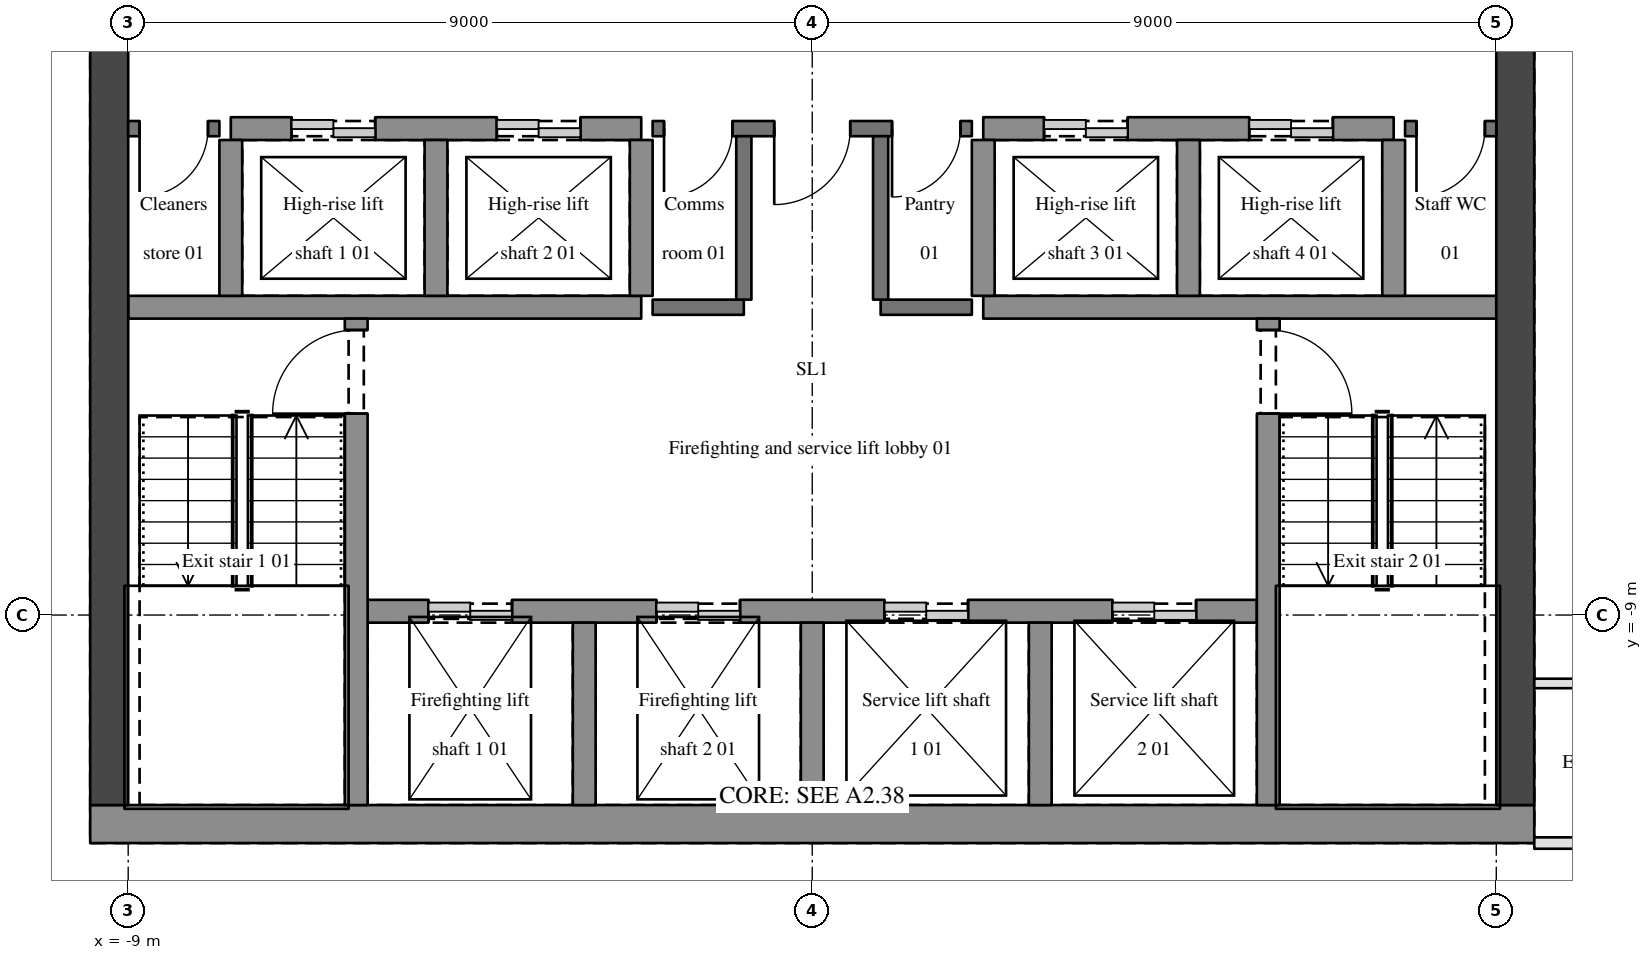
"""IFC4 building model, lengths in metres.
Left out: names, types, materials, properties, quantities, classifications, styles, units other than length and angle.
Written with IfcOpenShell. Run it as: python <this file> out.ifc"""

import sys

from ifc_helpers import new_model, si_unit, direction, frame, frame_2d, origin, place, context, subcontext, project, spatial, rectangle, extrude, element, fill, save


model = new_model("IFC4")
c1 = context("Model", 3, precision=1e-05, world=origin(), true_north=direction((0.0, 1.0)))
c2 = subcontext(c1, "Body", "Model", "MODEL_VIEW")
j1 = project(units=[si_unit("LENGTHUNIT", "METRE"), si_unit("PLANEANGLEUNIT", "RADIAN")], contexts=[c1])
p1 = place(None, origin())
s1 = spatial("IfcSite", under=j1, at=p1, CompositionType="ELEMENT")
p2 = place(p1, origin())
s2 = spatial("IfcBuilding", under=s1, at=p2, CompositionType="ELEMENT")
p3 = place(p2, frame((0.0, 0.0, 259.5)))
s3 = spatial("IfcBuildingStorey", under=s2, at=p3, CompositionType="ELEMENT", Elevation=259.5)
p4 = place(p3, frame((-9.5, -11.75, 0.0), z_axis=(0.0, 0.0, 1.0), x_axis=(1.0, 0.0, 0.0)))
e1 = element("IfcWall", 1, at=p4, inside=s3, PredefinedType="SHEAR", context=c2, shape_type="SweptSolid", body=[
    extrude(rectangle(XDim=19.0, YDim=0.5, at=frame_2d((9.5, 0.0))), origin(), (0.0, 0.0, 1.0), 3.15),
])
for number, where, z_axis, x_axis in (
    (2, (-9.25, -11.5, 0.0), (0.0, 0.0, 1.0), (0.0, 1.0, 0.0)),
    (3, (9.25, -11.5, 0.0), (0.0, 0.0, 1.0), (0.0, 1.0, 0.0)),
):
    element("IfcWall", number, at=place(p3, frame(where, z_axis=z_axis, x_axis=x_axis)), inside=s3, PredefinedType="SHEAR", context=c2, shape_type="SweptSolid", body=[
        extrude(rectangle(XDim=11.65, YDim=0.5, at=frame_2d((5.825, 0.0))), origin(), (0.0, 0.0, 1.0), 3.15),
    ])
p5 = place(p3, frame((9.5, -12.0, 0.0), z_axis=(0.0, 0.0, 1.0), x_axis=(1.0, 0.0, 0.0)))
e4 = element("IfcWall", 4, at=p5, inside=s3, PredefinedType="PARTITIONING", context=c2, shape_type="SweptSolid", body=[
    extrude(rectangle(XDim=10.243, YDim=0.15, at=frame_2d((5.122, 0.0))), origin(), (0.0, 0.0, 1.0), 2.21),
])
p6 = place(p3, frame((9.5, -9.9, 0.0), z_axis=(0.0, 0.0, 1.0), x_axis=(1.0, 0.0, 0.0)))
e5 = element("IfcWall", 5, at=p6, inside=s3, PredefinedType="PARTITIONING", context=c2, shape_type="SweptSolid", body=[
    extrude(rectangle(XDim=2.938, YDim=0.125, at=frame_2d((1.469, 0.0))), origin(), (0.0, 0.0, 1.0), 2.21),
])
p7 = place(p3, frame((-5.85, -8.95, 0.0), z_axis=(0.0, 0.0, 1.0), x_axis=(1.0, 0.0, 0.0)))
e6 = element("IfcWall", 6, at=p7, inside=s3, PredefinedType="SHEAR", context=c2, shape_type="SweptSolid", body=[
    extrude(rectangle(XDim=11.7, YDim=0.3, at=frame_2d((5.85, 0.0))), origin(), (0.0, 0.0, 1.0), 3.15),
])
p8 = place(p7, frame((0.8, 0.0, 0.0)))
e7 = element("IfcOpeningElement", 7, at=p8, cuts=e6, PredefinedType="OPENING", context=c2, shape_type="SweptSolid", body=[
    extrude(rectangle(XDim=1.1, YDim=2.1, at=frame_2d((0.55, 1.05))), frame((0.0, 0.16, 0.0), z_axis=(0.0, -1.0, 0.0), x_axis=(1.0, 0.0, 0.0)), (0.0, 0.0, 1.0), 0.32),
])
p9 = place(p7, frame((3.8, 0.0, 0.0)))
e8 = element("IfcOpeningElement", 8, at=p9, cuts=e6, PredefinedType="OPENING", context=c2, shape_type="SweptSolid", body=[
    extrude(rectangle(XDim=1.1, YDim=2.1, at=frame_2d((0.55, 1.05))), frame((0.0, 0.16, 0.0), z_axis=(0.0, -1.0, 0.0), x_axis=(1.0, 0.0, 0.0)), (0.0, 0.0, 1.0), 0.32),
])
p10 = place(p7, frame((6.8, 0.0, 0.0)))
e9 = element("IfcOpeningElement", 9, at=p10, cuts=e6, PredefinedType="OPENING", context=c2, shape_type="SweptSolid", body=[
    extrude(rectangle(XDim=1.1, YDim=2.1, at=frame_2d((0.55, 1.05))), frame((0.0, 0.16, 0.0), z_axis=(0.0, -1.0, 0.0), x_axis=(1.0, 0.0, 0.0)), (0.0, 0.0, 1.0), 0.32),
])
p11 = place(p7, frame((9.8, 0.0, 0.0)))
e10 = element("IfcOpeningElement", 10, at=p11, cuts=e6, PredefinedType="OPENING", context=c2, shape_type="SweptSolid", body=[
    extrude(rectangle(XDim=1.1, YDim=2.1, at=frame_2d((0.55, 1.05))), frame((0.0, 0.16, 0.0), z_axis=(0.0, -1.0, 0.0), x_axis=(1.0, 0.0, 0.0)), (0.0, 0.0, 1.0), 0.32),
])
p12 = place(p3, frame((-9.0, -4.95, 0.0), z_axis=(0.0, 0.0, 1.0), x_axis=(1.0, 0.0, 0.0)))
e11 = element("IfcWall", 11, at=p12, inside=s3, PredefinedType="SHEAR", context=c2, shape_type="SweptSolid", body=[
    extrude(rectangle(XDim=6.75, YDim=0.3, at=frame_2d((3.375, 0.0))), origin(), (0.0, 0.0, 1.0), 3.15),
])
for number, where, z_axis, x_axis in (
    (12, (-2.1, -4.95, 0.0), (0.0, 0.0, 1.0), (1.0, 0.0, 0.0)),
    (13, (0.9, -4.95, 0.0), (0.0, 0.0, 1.0), (1.0, 0.0, 0.0)),
):
    element("IfcWall", number, at=place(p3, frame(where, z_axis=z_axis, x_axis=x_axis)), inside=s3, PredefinedType="SOLIDWALL", context=c2, shape_type="SweptSolid", body=[
        extrude(rectangle(XDim=1.2, YDim=0.2, at=frame_2d((0.6, 0.0))), origin(), (0.0, 0.0, 1.0), 2.85),
    ])
p13 = place(p3, frame((2.25, -4.95, 0.0), z_axis=(0.0, 0.0, 1.0), x_axis=(1.0, 0.0, 0.0)))
e14 = element("IfcWall", 14, at=p13, inside=s3, PredefinedType="SHEAR", context=c2, shape_type="SweptSolid", body=[
    extrude(rectangle(XDim=6.75, YDim=0.3, at=frame_2d((3.375, 0.0))), origin(), (0.0, 0.0, 1.0), 3.15),
])
p14 = place(p3, frame((-7.8, -2.6, 0.0), z_axis=(0.0, 0.0, 1.0), x_axis=(-1.0, 0.0, 0.0)))
e15 = element("IfcWall", 15, at=p14, inside=s3, PredefinedType="SOLIDWALL", context=c2, shape_type="SweptSolid", body=[
    extrude(rectangle(XDim=1.2, YDim=0.2, at=frame_2d((0.6, 0.0))), origin(), (0.0, 0.0, 1.0), 2.85),
])
p15 = place(p14, frame((0.15, 0.0, 0.0)))
e16 = element("IfcOpeningElement", 16, at=p15, cuts=e15, PredefinedType="OPENING", context=c2, shape_type="SweptSolid", body=[
    extrude(rectangle(XDim=0.9, YDim=2.1, at=frame_2d((0.45, 1.05))), frame((0.0, 0.11, 0.0), z_axis=(0.0, -1.0, 0.0), x_axis=(1.0, 0.0, 0.0)), (0.0, 0.0, 1.0), 0.22),
])
p16 = place(p3, frame((-7.65, -2.6, 0.0), z_axis=(0.0, 0.0, 1.0), x_axis=(1.0, 0.0, 0.0)))
e17 = element("IfcWall", 17, at=p16, inside=s3, PredefinedType="SHEAR", context=c2, shape_type="SweptSolid", body=[
    extrude(rectangle(XDim=5.4, YDim=0.3, at=frame_2d((2.7, 0.0))), origin(), (0.0, 0.0, 1.0), 3.15),
])
p17 = place(p16, frame((0.8, 0.0, 0.0)))
e18 = element("IfcOpeningElement", 18, at=p17, cuts=e17, PredefinedType="OPENING", context=c2, shape_type="SweptSolid", body=[
    extrude(rectangle(XDim=1.1, YDim=2.1, at=frame_2d((0.55, 1.05))), frame((0.0, 0.16, 0.0), z_axis=(0.0, -1.0, 0.0), x_axis=(1.0, 0.0, 0.0)), (0.0, 0.0, 1.0), 0.32),
])
p18 = place(p16, frame((3.5, 0.0, 0.0)))
e19 = element("IfcOpeningElement", 19, at=p18, cuts=e17, PredefinedType="OPENING", context=c2, shape_type="SweptSolid", body=[
    extrude(rectangle(XDim=1.1, YDim=2.1, at=frame_2d((0.55, 1.05))), frame((0.0, 0.16, 0.0), z_axis=(0.0, -1.0, 0.0), x_axis=(1.0, 0.0, 0.0)), (0.0, 0.0, 1.0), 0.32),
])
p19 = place(p3, frame((2.1, -2.6, 0.0), z_axis=(0.0, 0.0, 1.0), x_axis=(-1.0, 0.0, 0.0)))
e20 = element("IfcWall", 20, at=p19, inside=s3, PredefinedType="SOLIDWALL", context=c2, shape_type="SweptSolid", body=[
    extrude(rectangle(XDim=4.2, YDim=0.2, at=frame_2d((2.1, 0.0))), origin(), (0.0, 0.0, 1.0), 2.85),
])
p20 = place(p19, frame((1.6, 0.0, 0.0)))
e21 = element("IfcOpeningElement", 21, at=p20, cuts=e20, PredefinedType="OPENING", context=c2, shape_type="SweptSolid", body=[
    extrude(rectangle(XDim=1.0, YDim=2.1, at=frame_2d((0.5, 1.05))), frame((0.0, 0.11, 0.0), z_axis=(0.0, -1.0, 0.0), x_axis=(1.0, 0.0, 0.0)), (0.0, 0.0, 1.0), 0.22),
])
p21 = place(p19, frame((3.15, 0.0, 0.0)))
e22 = element("IfcOpeningElement", 22, at=p21, cuts=e20, PredefinedType="OPENING", context=c2, shape_type="SweptSolid", body=[
    extrude(rectangle(XDim=0.9, YDim=2.1, at=frame_2d((0.45, 1.05))), frame((0.0, 0.11, 0.0), z_axis=(0.0, -1.0, 0.0), x_axis=(1.0, 0.0, 0.0)), (0.0, 0.0, 1.0), 0.22),
])
p22 = place(p19, frame((0.15, 0.0, 0.0)))
e23 = element("IfcOpeningElement", 23, at=p22, cuts=e20, PredefinedType="OPENING", context=c2, shape_type="SweptSolid", body=[
    extrude(rectangle(XDim=0.9, YDim=2.1, at=frame_2d((0.45, 1.05))), frame((0.0, 0.11, 0.0), z_axis=(0.0, -1.0, 0.0), x_axis=(1.0, 0.0, 0.0)), (0.0, 0.0, 1.0), 0.22),
])
p23 = place(p3, frame((2.25, -2.6, 0.0), z_axis=(0.0, 0.0, 1.0), x_axis=(1.0, 0.0, 0.0)))
e24 = element("IfcWall", 24, at=p23, inside=s3, PredefinedType="SHEAR", context=c2, shape_type="SweptSolid", body=[
    extrude(rectangle(XDim=5.4, YDim=0.3, at=frame_2d((2.7, 0.0))), origin(), (0.0, 0.0, 1.0), 3.15),
])
p24 = place(p23, frame((0.8, 0.0, 0.0)))
e25 = element("IfcOpeningElement", 25, at=p24, cuts=e24, PredefinedType="OPENING", context=c2, shape_type="SweptSolid", body=[
    extrude(rectangle(XDim=1.1, YDim=2.1, at=frame_2d((0.55, 1.05))), frame((0.0, 0.16, 0.0), z_axis=(0.0, -1.0, 0.0), x_axis=(1.0, 0.0, 0.0)), (0.0, 0.0, 1.0), 0.32),
])
p25 = place(p23, frame((3.5, 0.0, 0.0)))
e26 = element("IfcOpeningElement", 26, at=p25, cuts=e24, PredefinedType="OPENING", context=c2, shape_type="SweptSolid", body=[
    extrude(rectangle(XDim=1.1, YDim=2.1, at=frame_2d((0.55, 1.05))), frame((0.0, 0.16, 0.0), z_axis=(0.0, -1.0, 0.0), x_axis=(1.0, 0.0, 0.0)), (0.0, 0.0, 1.0), 0.32),
])
p26 = place(p3, frame((9.0, -2.6, 0.0), z_axis=(0.0, 0.0, 1.0), x_axis=(-1.0, 0.0, 0.0)))
e27 = element("IfcWall", 27, at=p26, inside=s3, PredefinedType="SOLIDWALL", context=c2, shape_type="SweptSolid", body=[
    extrude(rectangle(XDim=1.2, YDim=0.2, at=frame_2d((0.6, 0.0))), origin(), (0.0, 0.0, 1.0), 2.85),
])
p27 = place(p26, frame((0.15, 0.0, 0.0)))
e28 = element("IfcOpeningElement", 28, at=p27, cuts=e27, PredefinedType="OPENING", context=c2, shape_type="SweptSolid", body=[
    extrude(rectangle(XDim=0.9, YDim=2.1, at=frame_2d((0.45, 1.05))), frame((0.0, 0.11, 0.0), z_axis=(0.0, -1.0, 0.0), x_axis=(1.0, 0.0, 0.0)), (0.0, 0.0, 1.0), 0.22),
])
p28 = place(p3, frame((-7.65, -4.8, 0.0), z_axis=(0.0, 0.0, 1.0), x_axis=(0.0, 1.0, 0.0)))
e29 = element("IfcWall", 29, at=p28, inside=s3, PredefinedType="SHEAR", context=c2, shape_type="SweptSolid", body=[
    extrude(rectangle(XDim=2.05, YDim=0.3, at=frame_2d((1.025, 0.0))), origin(), (0.0, 0.0, 1.0), 3.15),
])
p29 = place(p3, frame((-6.0, -11.5, 0.0), z_axis=(0.0, 0.0, 1.0), x_axis=(0.0, 1.0, 0.0)))
e30 = element("IfcWall", 30, at=p29, inside=s3, PredefinedType="SHEAR", context=c2, shape_type="SweptSolid", body=[
    extrude(rectangle(XDim=6.4, YDim=0.3, at=frame_2d((3.2, 0.0))), origin(), (0.0, 0.0, 1.0), 3.15),
])
p30 = place(p29, frame((5.15, 0.0, 0.0)))
e31 = element("IfcOpeningElement", 31, at=p30, cuts=e30, PredefinedType="OPENING", context=c2, shape_type="SweptSolid", body=[
    extrude(rectangle(XDim=1.1, YDim=2.1, at=frame_2d((0.55, 1.05))), frame((0.0, 0.16, 0.0), z_axis=(0.0, -1.0, 0.0), x_axis=(1.0, 0.0, 0.0)), (0.0, 0.0, 1.0), 0.32),
])
p31 = place(p3, frame((-4.95, -4.8, 0.0), z_axis=(0.0, 0.0, 1.0), x_axis=(0.0, 1.0, 0.0)))
e32 = element("IfcWall", 32, at=p31, inside=s3, PredefinedType="SHEAR", context=c2, shape_type="SweptSolid", body=[
    extrude(rectangle(XDim=2.05, YDim=0.3, at=frame_2d((1.025, 0.0))), origin(), (0.0, 0.0, 1.0), 3.15),
])
p32 = place(p3, frame((-3.0, -11.5, 0.0), z_axis=(0.0, 0.0, 1.0), x_axis=(0.0, 1.0, 0.0)))
e33 = element("IfcWall", 33, at=p32, inside=s3, PredefinedType="SHEAR", context=c2, shape_type="SweptSolid", body=[
    extrude(rectangle(XDim=2.4, YDim=0.3, at=frame_2d((1.2, 0.0))), origin(), (0.0, 0.0, 1.0), 3.15),
])
p33 = place(p3, frame((-2.25, -4.8, 0.0), z_axis=(0.0, 0.0, 1.0), x_axis=(0.0, 1.0, 0.0)))
e34 = element("IfcWall", 34, at=p33, inside=s3, PredefinedType="SHEAR", context=c2, shape_type="SweptSolid", body=[
    extrude(rectangle(XDim=2.05, YDim=0.3, at=frame_2d((1.025, 0.0))), origin(), (0.0, 0.0, 1.0), 3.15),
])
p34 = place(p3, frame((-0.9, -4.85, 0.0), z_axis=(0.0, 0.0, 1.0), x_axis=(0.0, 1.0, 0.0)))
e35 = element("IfcWall", 35, at=p34, inside=s3, PredefinedType="SOLIDWALL", context=c2, shape_type="SweptSolid", body=[
    extrude(rectangle(XDim=2.15, YDim=0.2, at=frame_2d((1.075, 0.0))), origin(), (0.0, 0.0, 1.0), 2.85),
])
p35 = place(p3, frame((0.0, -11.5, 0.0), z_axis=(0.0, 0.0, 1.0), x_axis=(0.0, 1.0, 0.0)))
e36 = element("IfcWall", 36, at=p35, inside=s3, PredefinedType="SHEAR", context=c2, shape_type="SweptSolid", body=[
    extrude(rectangle(XDim=2.4, YDim=0.3, at=frame_2d((1.2, 0.0))), origin(), (0.0, 0.0, 1.0), 3.15),
])
p36 = place(p3, frame((0.9, -4.85, 0.0), z_axis=(0.0, 0.0, 1.0), x_axis=(0.0, 1.0, 0.0)))
e37 = element("IfcWall", 37, at=p36, inside=s3, PredefinedType="SOLIDWALL", context=c2, shape_type="SweptSolid", body=[
    extrude(rectangle(XDim=2.15, YDim=0.2, at=frame_2d((1.075, 0.0))), origin(), (0.0, 0.0, 1.0), 2.85),
])
p37 = place(p3, frame((2.25, -4.8, 0.0), z_axis=(0.0, 0.0, 1.0), x_axis=(0.0, 1.0, 0.0)))
e38 = element("IfcWall", 38, at=p37, inside=s3, PredefinedType="SHEAR", context=c2, shape_type="SweptSolid", body=[
    extrude(rectangle(XDim=2.05, YDim=0.3, at=frame_2d((1.025, 0.0))), origin(), (0.0, 0.0, 1.0), 3.15),
])
p38 = place(p3, frame((3.0, -11.5, 0.0), z_axis=(0.0, 0.0, 1.0), x_axis=(0.0, 1.0, 0.0)))
e39 = element("IfcWall", 39, at=p38, inside=s3, PredefinedType="SHEAR", context=c2, shape_type="SweptSolid", body=[
    extrude(rectangle(XDim=2.4, YDim=0.3, at=frame_2d((1.2, 0.0))), origin(), (0.0, 0.0, 1.0), 3.15),
])
p39 = place(p3, frame((4.95, -4.8, 0.0), z_axis=(0.0, 0.0, 1.0), x_axis=(0.0, 1.0, 0.0)))
e40 = element("IfcWall", 40, at=p39, inside=s3, PredefinedType="SHEAR", context=c2, shape_type="SweptSolid", body=[
    extrude(rectangle(XDim=2.05, YDim=0.3, at=frame_2d((1.025, 0.0))), origin(), (0.0, 0.0, 1.0), 3.15),
])
p40 = place(p3, frame((6.0, -5.1, 0.0), z_axis=(0.0, 0.0, 1.0), x_axis=(0.0, -1.0, 0.0)))
e41 = element("IfcWall", 41, at=p40, inside=s3, PredefinedType="SHEAR", context=c2, shape_type="SweptSolid", body=[
    extrude(rectangle(XDim=6.4, YDim=0.3, at=frame_2d((3.2, 0.0))), origin(), (0.0, 0.0, 1.0), 3.15),
])
p41 = place(p40, frame((0.15, 0.0, 0.0)))
e42 = element("IfcOpeningElement", 42, at=p41, cuts=e41, PredefinedType="OPENING", context=c2, shape_type="SweptSolid", body=[
    extrude(rectangle(XDim=1.1, YDim=2.1, at=frame_2d((0.55, 1.05))), frame((0.0, 0.16, 0.0), z_axis=(0.0, -1.0, 0.0), x_axis=(1.0, 0.0, 0.0)), (0.0, 0.0, 1.0), 0.32),
])
p42 = place(p3, frame((7.65, -4.8, 0.0), z_axis=(0.0, 0.0, 1.0), x_axis=(0.0, 1.0, 0.0)))
e43 = element("IfcWall", 43, at=p42, inside=s3, PredefinedType="SHEAR", context=c2, shape_type="SweptSolid", body=[
    extrude(rectangle(XDim=2.05, YDim=0.3, at=frame_2d((1.025, 0.0))), origin(), (0.0, 0.0, 1.0), 3.15),
])
p43 = place(p20, origin())
e44 = element("IfcDoor", 44, at=p43, inside=s3, OperationType="SINGLE_SWING_RIGHT", PredefinedType="DOOR", context=c2, shape_type="SweptSolid", body=[
    extrude(rectangle(XDim=1.0, YDim=2.1, at=frame_2d((0.5, 1.05))), frame((0.0, 0.025, 0.0), z_axis=(0.0, -1.0, 0.0), x_axis=(1.0, 0.0, 0.0)), (0.0, 0.0, 1.0), 0.05),
])
fill(e21, e44)
p44 = place(p30, origin())
e45 = element("IfcDoor", 45, at=p44, inside=s3, OperationType="SINGLE_SWING_LEFT", PredefinedType="DOOR", context=c2, shape_type="SweptSolid", body=[
    extrude(rectangle(XDim=1.1, YDim=2.1, at=frame_2d((0.55, 1.05))), frame((0.0, 0.025, 0.0), z_axis=(0.0, -1.0, 0.0), x_axis=(1.0, 0.0, 0.0)), (0.0, 0.0, 1.0), 0.05),
])
fill(e31, e45)
p45 = place(p41, origin())
e46 = element("IfcDoor", 46, at=p45, inside=s3, OperationType="SINGLE_SWING_RIGHT", PredefinedType="DOOR", context=c2, shape_type="SweptSolid", body=[
    extrude(rectangle(XDim=1.1, YDim=2.1, at=frame_2d((0.55, 1.05))), frame((0.0, 0.025, 0.0), z_axis=(0.0, -1.0, 0.0), x_axis=(1.0, 0.0, 0.0)), (0.0, 0.0, 1.0), 0.05),
])
fill(e42, e46)
p46 = place(p21, origin())
e47 = element("IfcDoor", 47, at=p46, inside=s3, OperationType="SINGLE_SWING_RIGHT", PredefinedType="DOOR", context=c2, shape_type="SweptSolid", body=[
    extrude(rectangle(XDim=0.9, YDim=2.1, at=frame_2d((0.45, 1.05))), frame((0.0, 0.025, 0.0), z_axis=(0.0, -1.0, 0.0), x_axis=(1.0, 0.0, 0.0)), (0.0, 0.0, 1.0), 0.05),
])
fill(e22, e47)
p47 = place(p22, origin())
e48 = element("IfcDoor", 48, at=p47, inside=s3, OperationType="SINGLE_SWING_RIGHT", PredefinedType="DOOR", context=c2, shape_type="SweptSolid", body=[
    extrude(rectangle(XDim=0.9, YDim=2.1, at=frame_2d((0.45, 1.05))), frame((0.0, 0.025, 0.0), z_axis=(0.0, -1.0, 0.0), x_axis=(1.0, 0.0, 0.0)), (0.0, 0.0, 1.0), 0.05),
])
fill(e23, e48)
p48 = place(p27, origin())
e49 = element("IfcDoor", 49, at=p48, inside=s3, OperationType="SINGLE_SWING_RIGHT", PredefinedType="DOOR", context=c2, shape_type="SweptSolid", body=[
    extrude(rectangle(XDim=0.9, YDim=2.1, at=frame_2d((0.45, 1.05))), frame((0.0, 0.025, 0.0), z_axis=(0.0, -1.0, 0.0), x_axis=(1.0, 0.0, 0.0)), (0.0, 0.0, 1.0), 0.05),
])
fill(e28, e49)
p49 = place(p15, origin())
e50 = element("IfcDoor", 50, at=p49, inside=s3, OperationType="SINGLE_SWING_RIGHT", PredefinedType="DOOR", context=c2, shape_type="SweptSolid", body=[
    extrude(rectangle(XDim=0.9, YDim=2.1, at=frame_2d((0.45, 1.05))), frame((0.0, 0.025, 0.0), z_axis=(0.0, -1.0, 0.0), x_axis=(1.0, 0.0, 0.0)), (0.0, 0.0, 1.0), 0.05),
])
fill(e16, e50)
p50 = place(p8, origin())
e51 = element("IfcDoor", 51, at=p50, inside=s3, OperationType="DOUBLE_DOOR_SLIDING", PredefinedType="DOOR", context=c2, shape_type="SweptSolid", body=[
    extrude(rectangle(XDim=1.1, YDim=2.1, at=frame_2d((0.55, 1.05))), frame((0.0, 0.025, 0.0), z_axis=(0.0, -1.0, 0.0), x_axis=(1.0, 0.0, 0.0)), (0.0, 0.0, 1.0), 0.05),
])
fill(e7, e51)
p51 = place(p9, origin())
e52 = element("IfcDoor", 52, at=p51, inside=s3, OperationType="DOUBLE_DOOR_SLIDING", PredefinedType="DOOR", context=c2, shape_type="SweptSolid", body=[
    extrude(rectangle(XDim=1.1, YDim=2.1, at=frame_2d((0.55, 1.05))), frame((0.0, 0.025, 0.0), z_axis=(0.0, -1.0, 0.0), x_axis=(1.0, 0.0, 0.0)), (0.0, 0.0, 1.0), 0.05),
])
fill(e8, e52)
p52 = place(p17, origin())
e53 = element("IfcDoor", 53, at=p52, inside=s3, OperationType="DOUBLE_DOOR_SLIDING", PredefinedType="DOOR", context=c2, shape_type="SweptSolid", body=[
    extrude(rectangle(XDim=1.1, YDim=2.1, at=frame_2d((0.55, 1.05))), frame((0.0, 0.025, 0.0), z_axis=(0.0, -1.0, 0.0), x_axis=(1.0, 0.0, 0.0)), (0.0, 0.0, 1.0), 0.05),
])
fill(e18, e53)
p53 = place(p18, origin())
e54 = element("IfcDoor", 54, at=p53, inside=s3, OperationType="DOUBLE_DOOR_SLIDING", PredefinedType="DOOR", context=c2, shape_type="SweptSolid", body=[
    extrude(rectangle(XDim=1.1, YDim=2.1, at=frame_2d((0.55, 1.05))), frame((0.0, 0.025, 0.0), z_axis=(0.0, -1.0, 0.0), x_axis=(1.0, 0.0, 0.0)), (0.0, 0.0, 1.0), 0.05),
])
fill(e19, e54)
p54 = place(p24, origin())
e55 = element("IfcDoor", 55, at=p54, inside=s3, OperationType="DOUBLE_DOOR_SLIDING", PredefinedType="DOOR", context=c2, shape_type="SweptSolid", body=[
    extrude(rectangle(XDim=1.1, YDim=2.1, at=frame_2d((0.55, 1.05))), frame((0.0, 0.025, 0.0), z_axis=(0.0, -1.0, 0.0), x_axis=(1.0, 0.0, 0.0)), (0.0, 0.0, 1.0), 0.05),
])
fill(e25, e55)
p55 = place(p25, origin())
e56 = element("IfcDoor", 56, at=p55, inside=s3, OperationType="DOUBLE_DOOR_SLIDING", PredefinedType="DOOR", context=c2, shape_type="SweptSolid", body=[
    extrude(rectangle(XDim=1.1, YDim=2.1, at=frame_2d((0.55, 1.05))), frame((0.0, 0.025, 0.0), z_axis=(0.0, -1.0, 0.0), x_axis=(1.0, 0.0, 0.0)), (0.0, 0.0, 1.0), 0.05),
])
fill(e26, e56)
p56 = place(p10, origin())
e57 = element("IfcDoor", 57, at=p56, inside=s3, OperationType="DOUBLE_DOOR_SLIDING", PredefinedType="DOOR", context=c2, shape_type="SweptSolid", body=[
    extrude(rectangle(XDim=1.1, YDim=2.1, at=frame_2d((0.55, 1.05))), frame((0.0, 0.025, 0.0), z_axis=(0.0, -1.0, 0.0), x_axis=(1.0, 0.0, 0.0)), (0.0, 0.0, 1.0), 0.05),
])
fill(e9, e57)
p57 = place(p11, origin())
e58 = element("IfcDoor", 58, at=p57, inside=s3, OperationType="DOUBLE_DOOR_SLIDING", PredefinedType="DOOR", context=c2, shape_type="SweptSolid", body=[
    extrude(rectangle(XDim=1.1, YDim=2.1, at=frame_2d((0.55, 1.05))), frame((0.0, 0.025, 0.0), z_axis=(0.0, -1.0, 0.0), x_axis=(1.0, 0.0, 0.0)), (0.0, 0.0, 1.0), 0.05),
])
fill(e10, e58)
save(model, sys.argv[1])
